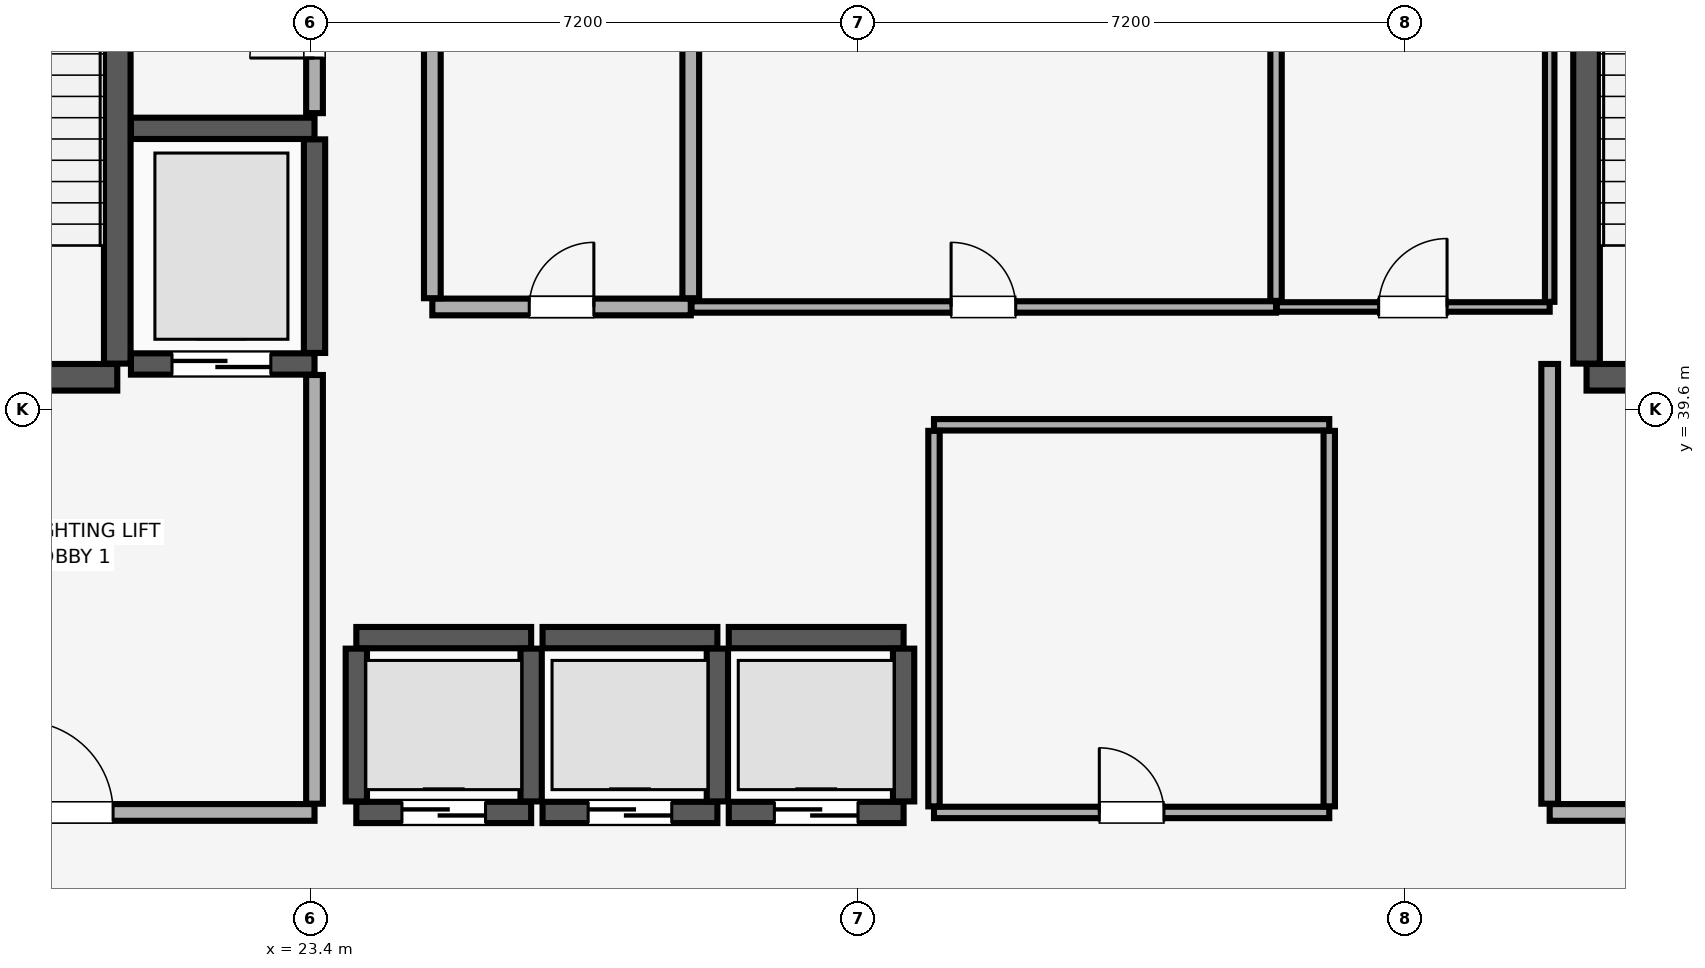
"""IFC4 building model, lengths in metres.
Left out: names, types, materials, properties, quantities, classifications, styles, units other than length and angle.
Written with IfcOpenShell. Run it as: python <this file> out.ifc"""

import sys

from ifc_helpers import new_model, si_unit, direction, frame, frame_2d, origin, place, context, subcontext, project, spatial, rectangle, extrude, element, fill, save


model = new_model("IFC4")
c1 = context("Model", 3, precision=1e-05, world=origin(), true_north=direction((0.0, 1.0)))
c2 = subcontext(c1, "Body", "Model", "MODEL_VIEW")
j1 = project(units=[si_unit("LENGTHUNIT", "METRE"), si_unit("PLANEANGLEUNIT", "RADIAN")], contexts=[c1])
p1 = place(None, origin())
s1 = spatial("IfcSite", under=j1, at=p1, CompositionType="ELEMENT")
p2 = place(p1, origin())
s2 = spatial("IfcBuilding", under=s1, at=p2, CompositionType="ELEMENT")
p3 = place(p2, frame((0.0, 0.0, 126.8)))
s3 = spatial("IfcBuildingStorey", under=s2, at=p3, CompositionType="ELEMENT", Elevation=126.8)
p4 = place(p3, frame((16.655, 40.025, 0.0), z_axis=(0.0, 0.0, 1.0), x_axis=(1.0, 0.0, 0.0)))
e1 = element("IfcWall", 1, at=p4, inside=s3, PredefinedType="SHEAR", context=c2, shape_type="SweptSolid", body=[
    extrude(rectangle(XDim=4.2, YDim=0.35, at=frame_2d((2.1, 0.0))), origin(), (0.0, 0.0, 1.0), 3.51),
])
p5 = place(p4, frame((1.81, 0.0, 0.0)))
e2 = element("IfcOpeningElement", 2, at=p5, cuts=e1, PredefinedType="OPENING", context=c2, shape_type="SweptSolid", body=[
    extrude(rectangle(XDim=1.15, YDim=2.15, at=frame_2d((0.575, 1.075))), frame((0.0, 0.185, 0.0), z_axis=(0.0, -1.0, 0.0), x_axis=(1.0, 0.0, 0.0)), (0.0, 0.0, 1.0), 0.37),
])
p6 = place(p3, frame((20.855, 40.205, 0.0), z_axis=(0.0, 0.0, 1.0), x_axis=(0.0, 1.0, 0.0)))
e3 = element("IfcWall", 3, at=p6, inside=s3, PredefinedType="SHEAR", context=c2, shape_type="SweptSolid", body=[
    extrude(rectangle(XDim=8.09, YDim=0.35, at=frame_2d((4.045, 0.0))), origin(), (0.0, 0.0, 1.0), 3.51),
])
p7 = place(p3, frame((40.185, 40.025, 0.0), z_axis=(0.0, 0.0, 1.0), x_axis=(1.0, 0.0, 0.0)))
e4 = element("IfcWall", 4, at=p7, inside=s3, PredefinedType="SHEAR", context=c2, shape_type="SweptSolid", body=[
    extrude(rectangle(XDim=3.63, YDim=0.35, at=frame_2d((1.815, 0.0))), origin(), (0.0, 0.0, 1.0), 3.51),
])
p8 = place(p7, frame((1.24, 0.0, 0.0)))
e5 = element("IfcOpeningElement", 5, at=p8, cuts=e4, PredefinedType="OPENING", context=c2, shape_type="SweptSolid", body=[
    extrude(rectangle(XDim=1.15, YDim=2.15, at=frame_2d((0.575, 1.075))), frame((0.0, 0.185, 0.0), z_axis=(0.0, -1.0, 0.0), x_axis=(1.0, 0.0, 0.0)), (0.0, 0.0, 1.0), 0.37),
])
p9 = place(p3, frame((40.185, 40.205, 0.0), z_axis=(0.0, 0.0, 1.0), x_axis=(0.0, 1.0, 0.0)))
e6 = element("IfcWall", 6, at=p9, inside=s3, PredefinedType="SHEAR", context=c2, shape_type="SweptSolid", body=[
    extrude(rectangle(XDim=8.09, YDim=0.35, at=frame_2d((4.045, 0.0))), origin(), (0.0, 0.0, 1.0), 3.51),
])
p10 = place(p3, frame((24.0, 34.3, 0.0), z_axis=(0.0, 0.0, 1.0), x_axis=(1.0, 0.0, 0.0)))
e7 = element("IfcWall", 7, at=p10, inside=s3, PredefinedType="SHEAR", context=c2, shape_type="SweptSolid", body=[
    extrude(rectangle(XDim=2.3, YDim=0.28, at=frame_2d((1.15, 0.0))), origin(), (0.0, 0.0, 1.0), 3.51),
])
p11 = place(p10, frame((0.6, 0.0, 0.0)))
e8 = element("IfcOpeningElement", 8, at=p11, cuts=e7, PredefinedType="OPENING", context=c2, shape_type="SweptSolid", body=[
    extrude(rectangle(XDim=1.1, YDim=2.2, at=frame_2d((0.55, 1.1))), frame((0.0, 0.15, 0.0), z_axis=(0.0, -1.0, 0.0), x_axis=(1.0, 0.0, 0.0)), (0.0, 0.0, 1.0), 0.3),
])
p12 = place(p3, frame((24.0, 36.6, 0.0), z_axis=(0.0, 0.0, 1.0), x_axis=(1.0, 0.0, 0.0)))
e9 = element("IfcWall", 9, at=p12, inside=s3, PredefinedType="SHEAR", context=c2, shape_type="SweptSolid", body=[
    extrude(rectangle(XDim=2.3, YDim=0.28, at=frame_2d((1.15, 0.0))), origin(), (0.0, 0.0, 1.0), 3.51),
])
for number, where, z_axis, x_axis in (
    (10, (24.0, 34.445, 0.0), (0.0, 0.0, 1.0), (0.0, 1.0, 0.0)),
    (11, (26.3, 34.445, 0.0), (0.0, 0.0, 1.0), (0.0, 1.0, 0.0)),
):
    element("IfcWall", number, at=place(p3, frame(where, z_axis=z_axis, x_axis=x_axis)), inside=s3, PredefinedType="SHEAR", context=c2, shape_type="SweptSolid", body=[
        extrude(rectangle(XDim=2.01, YDim=0.28, at=frame_2d((1.005, 0.0))), origin(), (0.0, 0.0, 1.0), 3.51),
    ])
p13 = place(p3, frame((26.45, 34.3, 0.0), z_axis=(0.0, 0.0, 1.0), x_axis=(1.0, 0.0, 0.0)))
e12 = element("IfcWall", 12, at=p13, inside=s3, PredefinedType="SHEAR", context=c2, shape_type="SweptSolid", body=[
    extrude(rectangle(XDim=2.3, YDim=0.28, at=frame_2d((1.15, 0.0))), origin(), (0.0, 0.0, 1.0), 3.51),
])
p14 = place(p13, frame((0.6, 0.0, 0.0)))
e13 = element("IfcOpeningElement", 13, at=p14, cuts=e12, PredefinedType="OPENING", context=c2, shape_type="SweptSolid", body=[
    extrude(rectangle(XDim=1.1, YDim=2.2, at=frame_2d((0.55, 1.1))), frame((0.0, 0.15, 0.0), z_axis=(0.0, -1.0, 0.0), x_axis=(1.0, 0.0, 0.0)), (0.0, 0.0, 1.0), 0.3),
])
p15 = place(p3, frame((26.45, 36.6, 0.0), z_axis=(0.0, 0.0, 1.0), x_axis=(1.0, 0.0, 0.0)))
e14 = element("IfcWall", 14, at=p15, inside=s3, PredefinedType="SHEAR", context=c2, shape_type="SweptSolid", body=[
    extrude(rectangle(XDim=2.3, YDim=0.28, at=frame_2d((1.15, 0.0))), origin(), (0.0, 0.0, 1.0), 3.51),
])
p16 = place(p3, frame((28.75, 34.445, 0.0), z_axis=(0.0, 0.0, 1.0), x_axis=(0.0, 1.0, 0.0)))
e15 = element("IfcWall", 15, at=p16, inside=s3, PredefinedType="SHEAR", context=c2, shape_type="SweptSolid", body=[
    extrude(rectangle(XDim=2.01, YDim=0.28, at=frame_2d((1.005, 0.0))), origin(), (0.0, 0.0, 1.0), 3.51),
])
p17 = place(p3, frame((28.9, 34.3, 0.0), z_axis=(0.0, 0.0, 1.0), x_axis=(1.0, 0.0, 0.0)))
e16 = element("IfcWall", 16, at=p17, inside=s3, PredefinedType="SHEAR", context=c2, shape_type="SweptSolid", body=[
    extrude(rectangle(XDim=2.3, YDim=0.28, at=frame_2d((1.15, 0.0))), origin(), (0.0, 0.0, 1.0), 3.51),
])
p18 = place(p17, frame((0.6, 0.0, 0.0)))
e17 = element("IfcOpeningElement", 17, at=p18, cuts=e16, PredefinedType="OPENING", context=c2, shape_type="SweptSolid", body=[
    extrude(rectangle(XDim=1.1, YDim=2.2, at=frame_2d((0.55, 1.1))), frame((0.0, 0.15, 0.0), z_axis=(0.0, -1.0, 0.0), x_axis=(1.0, 0.0, 0.0)), (0.0, 0.0, 1.0), 0.3),
])
p19 = place(p3, frame((28.9, 36.6, 0.0), z_axis=(0.0, 0.0, 1.0), x_axis=(1.0, 0.0, 0.0)))
e18 = element("IfcWall", 18, at=p19, inside=s3, PredefinedType="SHEAR", context=c2, shape_type="SweptSolid", body=[
    extrude(rectangle(XDim=2.3, YDim=0.28, at=frame_2d((1.15, 0.0))), origin(), (0.0, 0.0, 1.0), 3.51),
])
p20 = place(p3, frame((31.2, 34.445, 0.0), z_axis=(0.0, 0.0, 1.0), x_axis=(0.0, 1.0, 0.0)))
e19 = element("IfcWall", 19, at=p20, inside=s3, PredefinedType="SHEAR", context=c2, shape_type="SweptSolid", body=[
    extrude(rectangle(XDim=2.01, YDim=0.28, at=frame_2d((1.005, 0.0))), origin(), (0.0, 0.0, 1.0), 3.51),
])
p21 = place(p3, frame((21.035, 40.2, 0.0), z_axis=(0.0, 0.0, 1.0), x_axis=(1.0, 0.0, 0.0)))
e20 = element("IfcWall", 20, at=p21, inside=s3, PredefinedType="SHEAR", context=c2, shape_type="SweptSolid", body=[
    extrude(rectangle(XDim=2.415, YDim=0.28, at=frame_2d((1.208, 0.0))), origin(), (0.0, 0.0, 1.0), 3.51),
])
p22 = place(p21, frame((0.54, 0.0, 0.0)))
e21 = element("IfcOpeningElement", 21, at=p22, cuts=e20, PredefinedType="OPENING", context=c2, shape_type="SweptSolid", body=[
    extrude(rectangle(XDim=1.3, YDim=2.3, at=frame_2d((0.65, 1.15))), frame((0.0, 0.15, 0.0), z_axis=(0.0, -1.0, 0.0), x_axis=(1.0, 0.0, 0.0)), (0.0, 0.0, 1.0), 0.3),
])
p23 = place(p3, frame((21.035, 43.3, 0.0), z_axis=(0.0, 0.0, 1.0), x_axis=(1.0, 0.0, 0.0)))
e22 = element("IfcWall", 22, at=p23, inside=s3, PredefinedType="SHEAR", context=c2, shape_type="SweptSolid", body=[
    extrude(rectangle(XDim=2.415, YDim=0.28, at=frame_2d((1.208, 0.0))), origin(), (0.0, 0.0, 1.0), 3.51),
])
p24 = place(p3, frame((23.45, 40.345, 0.0), z_axis=(0.0, 0.0, 1.0), x_axis=(0.0, 1.0, 0.0)))
e23 = element("IfcWall", 23, at=p24, inside=s3, PredefinedType="SHEAR", context=c2, shape_type="SweptSolid", body=[
    extrude(rectangle(XDim=2.81, YDim=0.28, at=frame_2d((1.405, 0.0))), origin(), (0.0, 0.0, 1.0), 3.51),
])
p25 = place(p3, frame((17.4, 34.3, 0.0), z_axis=(0.0, 0.0, 1.0), x_axis=(1.0, 0.0, 0.0)))
e24 = element("IfcWall", 24, at=p25, inside=s3, PredefinedType="PARTITIONING", context=c2, shape_type="SweptSolid", body=[
    extrude(rectangle(XDim=6.05, YDim=0.22, at=frame_2d((3.025, 0.0))), origin(), (0.0, 0.0, 1.0), 3.51),
])
p26 = place(p25, frame((2.2, 0.0, 0.0)))
e25 = element("IfcOpeningElement", 25, at=p26, cuts=e24, PredefinedType="OPENING", context=c2, shape_type="SweptSolid", body=[
    extrude(rectangle(XDim=1.2, YDim=2.15, at=frame_2d((0.6, 1.075))), frame((0.0, 0.12, 0.0), z_axis=(0.0, -1.0, 0.0), x_axis=(1.0, 0.0, 0.0)), (0.0, 0.0, 1.0), 0.24),
])
p27 = place(p3, frame((23.45, 34.415, 0.0), z_axis=(0.0, 0.0, 1.0), x_axis=(0.0, 1.0, 0.0)))
e26 = element("IfcWall", 26, at=p27, inside=s3, PredefinedType="PARTITIONING", context=c2, shape_type="SweptSolid", body=[
    extrude(rectangle(XDim=5.64, YDim=0.22, at=frame_2d((2.82, 0.0))), origin(), (0.0, 0.0, 1.0), 3.51),
])
p28 = place(p3, frame((39.7, 34.3, 0.0), z_axis=(0.0, 0.0, 1.0), x_axis=(1.0, 0.0, 0.0)))
e27 = element("IfcWall", 27, at=p28, inside=s3, PredefinedType="PARTITIONING", context=c2, shape_type="SweptSolid", body=[
    extrude(rectangle(XDim=4.6, YDim=0.22, at=frame_2d((2.3, 0.0))), origin(), (0.0, 0.0, 1.0), 3.51),
])
p29 = place(p28, frame((1.7, 0.0, 0.0)))
e28 = element("IfcOpeningElement", 28, at=p29, cuts=e27, PredefinedType="OPENING", context=c2, shape_type="SweptSolid", body=[
    extrude(rectangle(XDim=1.2, YDim=2.15, at=frame_2d((0.6, 1.075))), frame((0.0, 0.12, 0.0), z_axis=(0.0, -1.0, 0.0), x_axis=(1.0, 0.0, 0.0)), (0.0, 0.0, 1.0), 0.24),
])
p30 = place(p3, frame((39.7, 34.415, 0.0), z_axis=(0.0, 0.0, 1.0), x_axis=(0.0, 1.0, 0.0)))
e29 = element("IfcWall", 29, at=p30, inside=s3, PredefinedType="PARTITIONING", context=c2, shape_type="SweptSolid", body=[
    extrude(rectangle(XDim=5.785, YDim=0.22, at=frame_2d((2.893, 0.0))), origin(), (0.0, 0.0, 1.0), 3.51),
])
p31 = place(p3, frame((23.45, 43.5, 0.0), z_axis=(0.0, 0.0, 1.0), x_axis=(0.0, 1.0, 0.0)))
e30 = element("IfcWall", 30, at=p31, inside=s3, PredefinedType="PARTITIONING", context=c2, shape_type="SweptSolid", body=[
    extrude(rectangle(XDim=2.235, YDim=0.22, at=frame_2d((1.118, 0.0))), origin(), (0.0, 0.0, 1.0), 3.51),
])
p32 = place(p31, frame((0.725, 0.0, 0.0)))
e31 = element("IfcOpeningElement", 31, at=p32, cuts=e30, PredefinedType="OPENING", context=c2, shape_type="SweptSolid", body=[
    extrude(rectangle(XDim=0.85, YDim=2.1, at=frame_2d((0.425, 1.05))), frame((0.0, 0.12, 0.0), z_axis=(0.0, -1.0, 0.0), x_axis=(1.0, 0.0, 0.0)), (0.0, 0.0, 1.0), 0.24),
])
p33 = place(p3, frame((31.6, 34.3, 0.0), z_axis=(0.0, 0.0, 1.0), x_axis=(1.0, 0.0, 0.0)))
e32 = element("IfcWall", 32, at=p33, inside=s3, PredefinedType="PARTITIONING", context=c2, shape_type="SweptSolid", body=[
    extrude(rectangle(XDim=5.2, YDim=0.15, at=frame_2d((2.6, 0.0))), origin(), (0.0, 0.0, 1.0), 3.51),
])
p34 = place(p33, frame((2.175, 0.0, 0.0)))
e33 = element("IfcOpeningElement", 33, at=p34, cuts=e32, PredefinedType="OPENING", context=c2, shape_type="SweptSolid", body=[
    extrude(rectangle(XDim=0.85, YDim=2.1, at=frame_2d((0.425, 1.05))), frame((0.0, 0.085, 0.0), z_axis=(0.0, -1.0, 0.0), x_axis=(1.0, 0.0, 0.0)), (0.0, 0.0, 1.0), 0.17),
])
p35 = place(p3, frame((31.6, 39.4, 0.0), z_axis=(0.0, 0.0, 1.0), x_axis=(1.0, 0.0, 0.0)))
e34 = element("IfcWall", 34, at=p35, inside=s3, PredefinedType="PARTITIONING", context=c2, shape_type="SweptSolid", body=[
    extrude(rectangle(XDim=5.2, YDim=0.15, at=frame_2d((2.6, 0.0))), origin(), (0.0, 0.0, 1.0), 3.51),
])
for number, where, z_axis, x_axis in (
    (35, (31.6, 34.38, 0.0), (0.0, 0.0, 1.0), (0.0, 1.0, 0.0)),
    (36, (36.8, 34.38, 0.0), (0.0, 0.0, 1.0), (0.0, 1.0, 0.0)),
):
    element("IfcWall", number, at=place(p3, frame(where, z_axis=z_axis, x_axis=x_axis)), inside=s3, PredefinedType="PARTITIONING", context=c2, shape_type="SweptSolid", body=[
        extrude(rectangle(XDim=4.94, YDim=0.15, at=frame_2d((2.47, 0.0))), origin(), (0.0, 0.0, 1.0), 3.51),
    ])
p36 = place(p3, frame((25.0, 40.95, 0.0), z_axis=(0.0, 0.0, 1.0), x_axis=(1.0, 0.0, 0.0)))
e37 = element("IfcWall", 37, at=p36, inside=s3, PredefinedType="PARTITIONING", context=c2, shape_type="SweptSolid", body=[
    extrude(rectangle(XDim=3.4, YDim=0.22, at=frame_2d((1.7, 0.0))), origin(), (0.0, 0.0, 1.0), 3.51),
])
p37 = place(p36, frame((1.275, 0.0, 0.0)))
e38 = element("IfcOpeningElement", 38, at=p37, cuts=e37, PredefinedType="OPENING", context=c2, shape_type="SweptSolid", body=[
    extrude(rectangle(XDim=0.85, YDim=2.1, at=frame_2d((0.425, 1.05))), frame((0.0, 0.12, 0.0), z_axis=(0.0, -1.0, 0.0), x_axis=(1.0, 0.0, 0.0)), (0.0, 0.0, 1.0), 0.24),
])
for number, where, z_axis, x_axis in (
    (39, (25.0, 41.065, 0.0), (0.0, 0.0, 1.0), (0.0, 1.0, 0.0)),
    (40, (28.4, 41.065, 0.0), (0.0, 0.0, 1.0), (0.0, 1.0, 0.0)),
):
    element("IfcWall", number, at=place(p3, frame(where, z_axis=z_axis, x_axis=x_axis)), inside=s3, PredefinedType="PARTITIONING", context=c2, shape_type="SweptSolid", body=[
        extrude(rectangle(XDim=7.785, YDim=0.22, at=frame_2d((3.893, 0.0))), origin(), (0.0, 0.0, 1.0), 3.51),
    ])
p38 = place(p3, frame((28.41, 40.95, 0.0), z_axis=(0.0, 0.0, 1.0), x_axis=(1.0, 0.0, 0.0)))
e41 = element("IfcWall", 41, at=p38, inside=s3, PredefinedType="PARTITIONING", context=c2, shape_type="SweptSolid", body=[
    extrude(rectangle(XDim=7.69, YDim=0.15, at=frame_2d((3.845, 0.0))), origin(), (0.0, 0.0, 1.0), 3.51),
])
p39 = place(p38, frame((3.415, 0.0, 0.0)))
e42 = element("IfcOpeningElement", 42, at=p39, cuts=e41, PredefinedType="OPENING", context=c2, shape_type="SweptSolid", body=[
    extrude(rectangle(XDim=0.85, YDim=2.1, at=frame_2d((0.425, 1.05))), frame((0.0, 0.085, 0.0), z_axis=(0.0, -1.0, 0.0), x_axis=(1.0, 0.0, 0.0)), (0.0, 0.0, 1.0), 0.17),
])
p40 = place(p3, frame((36.1, 41.03, 0.0), z_axis=(0.0, 0.0, 1.0), x_axis=(0.0, 1.0, 0.0)))
e43 = element("IfcWall", 43, at=p40, inside=s3, PredefinedType="PARTITIONING", context=c2, shape_type="SweptSolid", body=[
    extrude(rectangle(XDim=7.82, YDim=0.15, at=frame_2d((3.91, 0.0))), origin(), (0.0, 0.0, 1.0), 3.51),
])
p41 = place(p3, frame((36.11, 40.95, 0.0), z_axis=(0.0, 0.0, 1.0), x_axis=(1.0, 0.0, 0.0)))
e44 = element("IfcWall", 44, at=p41, inside=s3, PredefinedType="PARTITIONING", context=c2, shape_type="SweptSolid", body=[
    extrude(rectangle(XDim=3.59, YDim=0.125, at=frame_2d((1.795, 0.0))), origin(), (0.0, 0.0, 1.0), 3.51),
])
p42 = place(p41, frame((1.34, 0.0, 0.0)))
e45 = element("IfcOpeningElement", 45, at=p42, cuts=e44, PredefinedType="OPENING", context=c2, shape_type="SweptSolid", body=[
    extrude(rectangle(XDim=0.9, YDim=2.1, at=frame_2d((0.45, 1.05))), frame((0.0, 0.073, 0.0), z_axis=(0.0, -1.0, 0.0), x_axis=(1.0, 0.0, 0.0)), (0.0, 0.0, 1.0), 0.145),
])
p43 = place(p3, frame((39.7, 41.018, 0.0), z_axis=(0.0, 0.0, 1.0), x_axis=(0.0, 1.0, 0.0)))
e46 = element("IfcWall", 46, at=p43, inside=s3, PredefinedType="PARTITIONING", context=c2, shape_type="SweptSolid", body=[
    extrude(rectangle(XDim=3.715, YDim=0.125, at=frame_2d((1.857, 0.0))), origin(), (0.0, 0.0, 1.0), 3.51),
])
p44 = place(p11, origin())
e47 = element("IfcDoor", 47, at=p44, inside=s3, OperationType="DOUBLE_DOOR_SLIDING", PredefinedType="DOOR", context=c2, shape_type="SweptSolid", body=[
    extrude(rectangle(XDim=1.1, YDim=2.2, at=frame_2d((0.55, 1.1))), frame((0.0, 0.025, 0.0), z_axis=(0.0, -1.0, 0.0), x_axis=(1.0, 0.0, 0.0)), (0.0, 0.0, 1.0), 0.05),
])
fill(e8, e47)
p45 = place(p14, origin())
e48 = element("IfcDoor", 48, at=p45, inside=s3, OperationType="DOUBLE_DOOR_SLIDING", PredefinedType="DOOR", context=c2, shape_type="SweptSolid", body=[
    extrude(rectangle(XDim=1.1, YDim=2.2, at=frame_2d((0.55, 1.1))), frame((0.0, 0.025, 0.0), z_axis=(0.0, -1.0, 0.0), x_axis=(1.0, 0.0, 0.0)), (0.0, 0.0, 1.0), 0.05),
])
fill(e13, e48)
p46 = place(p18, origin())
e49 = element("IfcDoor", 49, at=p46, inside=s3, OperationType="DOUBLE_DOOR_SLIDING", PredefinedType="DOOR", context=c2, shape_type="SweptSolid", body=[
    extrude(rectangle(XDim=1.1, YDim=2.2, at=frame_2d((0.55, 1.1))), frame((0.0, 0.025, 0.0), z_axis=(0.0, -1.0, 0.0), x_axis=(1.0, 0.0, 0.0)), (0.0, 0.0, 1.0), 0.05),
])
fill(e17, e49)
p47 = place(p22, origin())
e50 = element("IfcDoor", 50, at=p47, inside=s3, OperationType="DOUBLE_DOOR_SLIDING", PredefinedType="DOOR", context=c2, shape_type="SweptSolid", body=[
    extrude(rectangle(XDim=1.3, YDim=2.3, at=frame_2d((0.65, 1.15))), frame((0.0, 0.025, 0.0), z_axis=(0.0, -1.0, 0.0), x_axis=(1.0, 0.0, 0.0)), (0.0, 0.0, 1.0), 0.05),
])
fill(e21, e50)
p48 = place(p26, origin())
e51 = element("IfcDoor", 51, at=p48, inside=s3, OperationType="SINGLE_SWING_LEFT", PredefinedType="DOOR", context=c2, shape_type="SweptSolid", body=[
    extrude(rectangle(XDim=1.2, YDim=2.15, at=frame_2d((0.6, 1.075))), frame((0.0, 0.025, 0.0), z_axis=(0.0, -1.0, 0.0), x_axis=(1.0, 0.0, 0.0)), (0.0, 0.0, 1.0), 0.05),
])
fill(e25, e51)
p49 = place(p32, origin())
e52 = element("IfcDoor", 52, at=p49, inside=s3, OperationType="SINGLE_SWING_LEFT", PredefinedType="DOOR", context=c2, shape_type="SweptSolid", body=[
    extrude(rectangle(XDim=0.85, YDim=2.1, at=frame_2d((0.425, 1.05))), frame((0.0, 0.025, 0.0), z_axis=(0.0, -1.0, 0.0), x_axis=(1.0, 0.0, 0.0)), (0.0, 0.0, 1.0), 0.05),
])
fill(e31, e52)
p50 = place(p34, origin())
e53 = element("IfcDoor", 53, at=p50, inside=s3, OperationType="SINGLE_SWING_LEFT", PredefinedType="DOOR", context=c2, shape_type="SweptSolid", body=[
    extrude(rectangle(XDim=0.85, YDim=2.1, at=frame_2d((0.425, 1.05))), frame((0.0, 0.025, 0.0), z_axis=(0.0, -1.0, 0.0), x_axis=(1.0, 0.0, 0.0)), (0.0, 0.0, 1.0), 0.05),
])
fill(e33, e53)
p51 = place(p37, origin())
e54 = element("IfcDoor", 54, at=p51, inside=s3, OperationType="SINGLE_SWING_RIGHT", PredefinedType="DOOR", context=c2, shape_type="SweptSolid", body=[
    extrude(rectangle(XDim=0.85, YDim=2.1, at=frame_2d((0.425, 1.05))), frame((0.0, 0.025, 0.0), z_axis=(0.0, -1.0, 0.0), x_axis=(1.0, 0.0, 0.0)), (0.0, 0.0, 1.0), 0.05),
])
fill(e38, e54)
p52 = place(p39, origin())
e55 = element("IfcDoor", 55, at=p52, inside=s3, OperationType="SINGLE_SWING_LEFT", PredefinedType="DOOR", context=c2, shape_type="SweptSolid", body=[
    extrude(rectangle(XDim=0.85, YDim=2.1, at=frame_2d((0.425, 1.05))), frame((0.0, 0.025, 0.0), z_axis=(0.0, -1.0, 0.0), x_axis=(1.0, 0.0, 0.0)), (0.0, 0.0, 1.0), 0.05),
])
fill(e42, e55)
p53 = place(p42, origin())
e56 = element("IfcDoor", 56, at=p53, inside=s3, OperationType="SINGLE_SWING_RIGHT", PredefinedType="DOOR", context=c2, shape_type="SweptSolid", body=[
    extrude(rectangle(XDim=0.9, YDim=2.1, at=frame_2d((0.45, 1.05))), frame((0.0, 0.025, 0.0), z_axis=(0.0, -1.0, 0.0), x_axis=(1.0, 0.0, 0.0)), (0.0, 0.0, 1.0), 0.05),
])
fill(e45, e56)
save(model, sys.argv[1])
